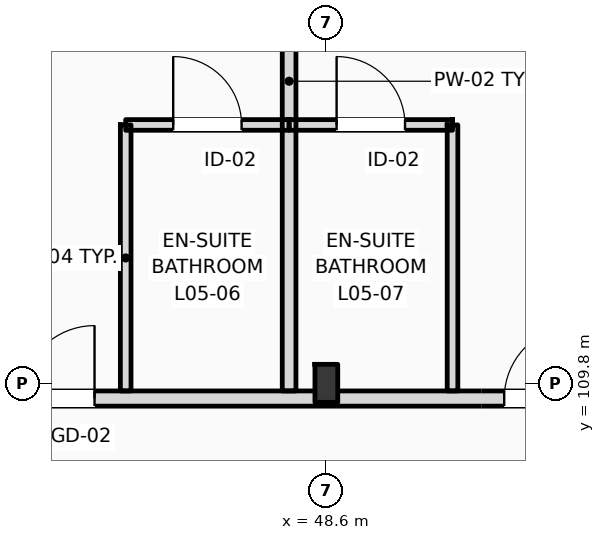
"""IFC4 building model, lengths in metres.
Left out: names, types, materials, properties, quantities, classifications, styles, units other than length and angle.
Written with IfcOpenShell. Run it as: python <this file> out.ifc"""

import sys

from ifc_helpers import new_model, si_unit, direction, frame, frame_2d, origin, origin_2d, place, context, subcontext, project, spatial, rectangle, i_section, extrude, element, fill, save


model = new_model("IFC4")
c1 = context("Model", 3, precision=1e-05, world=origin(), true_north=direction((0.0, 1.0)))
c2 = subcontext(c1, "Body", "Model", "MODEL_VIEW")
j1 = project(units=[si_unit("LENGTHUNIT", "METRE"), si_unit("PLANEANGLEUNIT", "RADIAN")], contexts=[c1])
p1 = place(None, origin())
s1 = spatial("IfcSite", under=j1, at=p1, CompositionType="ELEMENT")
p2 = place(p1, origin())
s2 = spatial("IfcBuilding", under=s1, at=p2, CompositionType="ELEMENT")
p3 = place(p2, frame((0.0, 0.0, 24.6)))
s3 = spatial("IfcBuildingStorey", under=s2, at=p3, CompositionType="ELEMENT", Elevation=24.6)
p4 = place(p3, frame((48.6, 109.8, 0.0), z_axis=(0.0, 0.0, 1.0), x_axis=(1.0, 0.0, 0.0)))
e1 = element("IfcColumn", 1, at=p4, inside=s3, PredefinedType="COLUMN", context=c2, shape_type="SweptSolid", body=[
    extrude(i_section(OverallWidth=0.3, OverallDepth=0.5, WebThickness=0.014, FlangeThickness=0.028, FilletRadius=0.027, at=origin_2d()), origin(), (0.0, 0.0, 1.0), 3.6),
])
p5 = place(p3, frame((10.65, 109.6, 0.0), z_axis=(0.0, 0.0, 1.0), x_axis=(1.0, 0.0, 0.0)))
e2 = element("IfcWall", 2, at=p5, inside=s3, PredefinedType="PARTITIONING", context=c2, shape_type="SweptSolid", body=[
    extrude(rectangle(XDim=109.21, YDim=0.2, at=frame_2d((54.605, 0.0))), origin(), (0.0, 0.0, 1.0), 2.78),
])
p6 = place(p5, frame((12.705, 0.0, 0.0)))
e3 = element("IfcOpeningElement", 3, at=p6, cuts=e2, PredefinedType="OPENING", context=c2, shape_type="SweptSolid", body=[
    extrude(rectangle(XDim=1.02, YDim=2.2, at=frame_2d((0.51, 1.1))), frame((0.0, 0.11, 0.0), z_axis=(0.0, -1.0, 0.0), x_axis=(1.0, 0.0, 0.0)), (0.0, 0.0, 1.0), 0.22),
])
p7 = place(p5, frame((19.26, 0.0, 0.0)))
e4 = element("IfcOpeningElement", 4, at=p7, cuts=e2, PredefinedType="OPENING", context=c2, shape_type="SweptSolid", body=[
    extrude(rectangle(XDim=1.02, YDim=2.2, at=frame_2d((0.51, 1.1))), frame((0.0, 0.11, 0.0), z_axis=(0.0, -1.0, 0.0), x_axis=(1.0, 0.0, 0.0)), (0.0, 0.0, 1.0), 0.22),
])
p8 = place(p5, frame((23.71, 0.0, 0.0)))
e5 = element("IfcOpeningElement", 5, at=p8, cuts=e2, PredefinedType="OPENING", context=c2, shape_type="SweptSolid", body=[
    extrude(rectangle(XDim=1.02, YDim=2.2, at=frame_2d((0.51, 1.1))), frame((0.0, 0.11, 0.0), z_axis=(0.0, -1.0, 0.0), x_axis=(1.0, 0.0, 0.0)), (0.0, 0.0, 1.0), 0.22),
])
p9 = place(p5, frame((27.66, 0.0, 0.0)))
e6 = element("IfcOpeningElement", 6, at=p9, cuts=e2, PredefinedType="OPENING", context=c2, shape_type="SweptSolid", body=[
    extrude(rectangle(XDim=1.02, YDim=2.2, at=frame_2d((0.51, 1.1))), frame((0.0, 0.11, 0.0), z_axis=(0.0, -1.0, 0.0), x_axis=(1.0, 0.0, 0.0)), (0.0, 0.0, 1.0), 0.22),
])
p10 = place(p5, frame((31.89, 0.0, 0.0)))
e7 = element("IfcOpeningElement", 7, at=p10, cuts=e2, PredefinedType="OPENING", context=c2, shape_type="SweptSolid", body=[
    extrude(rectangle(XDim=0.96, YDim=2.2, at=frame_2d((0.48, 1.1))), frame((0.0, 0.11, 0.0), z_axis=(0.0, -1.0, 0.0), x_axis=(1.0, 0.0, 0.0)), (0.0, 0.0, 1.0), 0.22),
])
p11 = place(p5, frame((33.94, 0.0, 0.0)))
e8 = element("IfcOpeningElement", 8, at=p11, cuts=e2, PredefinedType="OPENING", context=c2, shape_type="SweptSolid", body=[
    extrude(rectangle(XDim=0.96, YDim=2.2, at=frame_2d((0.48, 1.1))), frame((0.0, 0.11, 0.0), z_axis=(0.0, -1.0, 0.0), x_axis=(1.0, 0.0, 0.0)), (0.0, 0.0, 1.0), 0.22),
])
p12 = place(p5, frame((40.29, 0.0, 0.0)))
e9 = element("IfcOpeningElement", 9, at=p12, cuts=e2, PredefinedType="OPENING", context=c2, shape_type="SweptSolid", body=[
    extrude(rectangle(XDim=0.96, YDim=2.2, at=frame_2d((0.48, 1.1))), frame((0.0, 0.11, 0.0), z_axis=(0.0, -1.0, 0.0), x_axis=(1.0, 0.0, 0.0)), (0.0, 0.0, 1.0), 0.22),
])
p13 = place(p5, frame((42.34, 0.0, 0.0)))
e10 = element("IfcOpeningElement", 10, at=p13, cuts=e2, PredefinedType="OPENING", context=c2, shape_type="SweptSolid", body=[
    extrude(rectangle(XDim=0.96, YDim=2.2, at=frame_2d((0.48, 1.1))), frame((0.0, 0.11, 0.0), z_axis=(0.0, -1.0, 0.0), x_axis=(1.0, 0.0, 0.0)), (0.0, 0.0, 1.0), 0.22),
])
p14 = place(p5, frame((48.69, 0.0, 0.0)))
e11 = element("IfcOpeningElement", 11, at=p14, cuts=e2, PredefinedType="OPENING", context=c2, shape_type="SweptSolid", body=[
    extrude(rectangle(XDim=0.96, YDim=2.2, at=frame_2d((0.48, 1.1))), frame((0.0, 0.11, 0.0), z_axis=(0.0, -1.0, 0.0), x_axis=(1.0, 0.0, 0.0)), (0.0, 0.0, 1.0), 0.22),
])
p15 = place(p5, frame((50.74, 0.0, 0.0)))
e12 = element("IfcOpeningElement", 12, at=p15, cuts=e2, PredefinedType="OPENING", context=c2, shape_type="SweptSolid", body=[
    extrude(rectangle(XDim=0.96, YDim=2.2, at=frame_2d((0.48, 1.1))), frame((0.0, 0.11, 0.0), z_axis=(0.0, -1.0, 0.0), x_axis=(1.0, 0.0, 0.0)), (0.0, 0.0, 1.0), 0.22),
])
p16 = place(p5, frame((57.09, 0.0, 0.0)))
e13 = element("IfcOpeningElement", 13, at=p16, cuts=e2, PredefinedType="OPENING", context=c2, shape_type="SweptSolid", body=[
    extrude(rectangle(XDim=0.96, YDim=2.2, at=frame_2d((0.48, 1.1))), frame((0.0, 0.11, 0.0), z_axis=(0.0, -1.0, 0.0), x_axis=(1.0, 0.0, 0.0)), (0.0, 0.0, 1.0), 0.22),
])
p17 = place(p5, frame((59.14, 0.0, 0.0)))
e14 = element("IfcOpeningElement", 14, at=p17, cuts=e2, PredefinedType="OPENING", context=c2, shape_type="SweptSolid", body=[
    extrude(rectangle(XDim=0.96, YDim=2.2, at=frame_2d((0.48, 1.1))), frame((0.0, 0.11, 0.0), z_axis=(0.0, -1.0, 0.0), x_axis=(1.0, 0.0, 0.0)), (0.0, 0.0, 1.0), 0.22),
])
p18 = place(p5, frame((65.49, 0.0, 0.0)))
e15 = element("IfcOpeningElement", 15, at=p18, cuts=e2, PredefinedType="OPENING", context=c2, shape_type="SweptSolid", body=[
    extrude(rectangle(XDim=0.96, YDim=2.2, at=frame_2d((0.48, 1.1))), frame((0.0, 0.11, 0.0), z_axis=(0.0, -1.0, 0.0), x_axis=(1.0, 0.0, 0.0)), (0.0, 0.0, 1.0), 0.22),
])
p19 = place(p5, frame((67.54, 0.0, 0.0)))
e16 = element("IfcOpeningElement", 16, at=p19, cuts=e2, PredefinedType="OPENING", context=c2, shape_type="SweptSolid", body=[
    extrude(rectangle(XDim=0.96, YDim=2.2, at=frame_2d((0.48, 1.1))), frame((0.0, 0.11, 0.0), z_axis=(0.0, -1.0, 0.0), x_axis=(1.0, 0.0, 0.0)), (0.0, 0.0, 1.0), 0.22),
])
p20 = place(p5, frame((73.89, 0.0, 0.0)))
e17 = element("IfcOpeningElement", 17, at=p20, cuts=e2, PredefinedType="OPENING", context=c2, shape_type="SweptSolid", body=[
    extrude(rectangle(XDim=0.96, YDim=2.2, at=frame_2d((0.48, 1.1))), frame((0.0, 0.11, 0.0), z_axis=(0.0, -1.0, 0.0), x_axis=(1.0, 0.0, 0.0)), (0.0, 0.0, 1.0), 0.22),
])
p21 = place(p5, frame((78.09, 0.0, 0.0)))
e18 = element("IfcOpeningElement", 18, at=p21, cuts=e2, PredefinedType="OPENING", context=c2, shape_type="SweptSolid", body=[
    extrude(rectangle(XDim=0.96, YDim=2.2, at=frame_2d((0.48, 1.1))), frame((0.0, 0.11, 0.0), z_axis=(0.0, -1.0, 0.0), x_axis=(1.0, 0.0, 0.0)), (0.0, 0.0, 1.0), 0.22),
])
p22 = place(p5, frame((82.29, 0.0, 0.0)))
e19 = element("IfcOpeningElement", 19, at=p22, cuts=e2, PredefinedType="OPENING", context=c2, shape_type="SweptSolid", body=[
    extrude(rectangle(XDim=0.96, YDim=2.2, at=frame_2d((0.48, 1.1))), frame((0.0, 0.11, 0.0), z_axis=(0.0, -1.0, 0.0), x_axis=(1.0, 0.0, 0.0)), (0.0, 0.0, 1.0), 0.22),
])
p23 = place(p5, frame((86.49, 0.0, 0.0)))
e20 = element("IfcOpeningElement", 20, at=p23, cuts=e2, PredefinedType="OPENING", context=c2, shape_type="SweptSolid", body=[
    extrude(rectangle(XDim=0.96, YDim=2.2, at=frame_2d((0.48, 1.1))), frame((0.0, 0.11, 0.0), z_axis=(0.0, -1.0, 0.0), x_axis=(1.0, 0.0, 0.0)), (0.0, 0.0, 1.0), 0.22),
])
p24 = place(p5, frame((88.54, 0.0, 0.0)))
e21 = element("IfcOpeningElement", 21, at=p24, cuts=e2, PredefinedType="OPENING", context=c2, shape_type="SweptSolid", body=[
    extrude(rectangle(XDim=0.96, YDim=2.2, at=frame_2d((0.48, 1.1))), frame((0.0, 0.11, 0.0), z_axis=(0.0, -1.0, 0.0), x_axis=(1.0, 0.0, 0.0)), (0.0, 0.0, 1.0), 0.22),
])
p25 = place(p5, frame((94.89, 0.0, 0.0)))
e22 = element("IfcOpeningElement", 22, at=p25, cuts=e2, PredefinedType="OPENING", context=c2, shape_type="SweptSolid", body=[
    extrude(rectangle(XDim=0.96, YDim=2.2, at=frame_2d((0.48, 1.1))), frame((0.0, 0.11, 0.0), z_axis=(0.0, -1.0, 0.0), x_axis=(1.0, 0.0, 0.0)), (0.0, 0.0, 1.0), 0.22),
])
p26 = place(p5, frame((96.94, 0.0, 0.0)))
e23 = element("IfcOpeningElement", 23, at=p26, cuts=e2, PredefinedType="OPENING", context=c2, shape_type="SweptSolid", body=[
    extrude(rectangle(XDim=0.96, YDim=2.2, at=frame_2d((0.48, 1.1))), frame((0.0, 0.11, 0.0), z_axis=(0.0, -1.0, 0.0), x_axis=(1.0, 0.0, 0.0)), (0.0, 0.0, 1.0), 0.22),
])
p27 = place(p5, frame((103.29, 0.0, 0.0)))
e24 = element("IfcOpeningElement", 24, at=p27, cuts=e2, PredefinedType="OPENING", context=c2, shape_type="SweptSolid", body=[
    extrude(rectangle(XDim=0.96, YDim=2.2, at=frame_2d((0.48, 1.1))), frame((0.0, 0.11, 0.0), z_axis=(0.0, -1.0, 0.0), x_axis=(1.0, 0.0, 0.0)), (0.0, 0.0, 1.0), 0.22),
])
p28 = place(p5, frame((105.25, 0.0, 0.0)))
e25 = element("IfcOpeningElement", 25, at=p28, cuts=e2, PredefinedType="OPENING", context=c2, shape_type="SweptSolid", body=[
    extrude(rectangle(XDim=0.96, YDim=2.2, at=frame_2d((0.48, 1.1))), frame((0.0, 0.11, 0.0), z_axis=(0.0, -1.0, 0.0), x_axis=(1.0, 0.0, 0.0)), (0.0, 0.0, 1.0), 0.22),
])
p29 = place(p5, frame((2.716, 0.0, 0.0)))
e26 = element("IfcOpeningElement", 26, at=p29, cuts=e2, PredefinedType="OPENING", context=c2, shape_type="SweptSolid", body=[
    extrude(rectangle(XDim=1.35, YDim=2.25, at=frame_2d((0.675, 1.125))), frame((0.0, 0.11, 0.0), z_axis=(0.0, -1.0, 0.0), x_axis=(1.0, 0.0, 0.0)), (0.0, 0.0, 1.0), 0.22),
])
p30 = place(p5, frame((6.65, 0.0, 0.0)))
e27 = element("IfcOpeningElement", 27, at=p30, cuts=e2, PredefinedType="OPENING", context=c2, shape_type="SweptSolid", body=[
    extrude(rectangle(XDim=1.35, YDim=2.25, at=frame_2d((0.675, 1.125))), frame((0.0, 0.11, 0.0), z_axis=(0.0, -1.0, 0.0), x_axis=(1.0, 0.0, 0.0)), (0.0, 0.0, 1.0), 0.22),
])
p31 = place(p5, frame((10.583, 0.0, 0.0)))
e28 = element("IfcOpeningElement", 28, at=p31, cuts=e2, PredefinedType="OPENING", context=c2, shape_type="SweptSolid", body=[
    extrude(rectangle(XDim=1.35, YDim=2.25, at=frame_2d((0.675, 1.125))), frame((0.0, 0.11, 0.0), z_axis=(0.0, -1.0, 0.0), x_axis=(1.0, 0.0, 0.0)), (0.0, 0.0, 1.0), 0.22),
])
p32 = place(p3, frame((48.11, 109.7, 0.0), z_axis=(0.0, 0.0, 1.0), x_axis=(0.0, 1.0, 0.0)))
e29 = element("IfcWall", 29, at=p32, inside=s3, PredefinedType="PARTITIONING", context=c2, shape_type="SweptSolid", body=[
    extrude(rectangle(XDim=8.15, YDim=0.18, at=frame_2d((4.075, 0.0))), origin(), (0.0, 0.0, 1.0), 3.34),
])
p33 = place(p3, frame((45.96, 109.7, 0.0), z_axis=(0.0, 0.0, 1.0), x_axis=(0.0, 1.0, 0.0)))
e30 = element("IfcWall", 30, at=p33, inside=s3, PredefinedType="PARTITIONING", context=c2, shape_type="SweptSolid", body=[
    extrude(rectangle(XDim=3.5, YDim=0.14, at=frame_2d((1.75, 0.0))), origin(), (0.0, 0.0, 1.0), 3.03),
])
p34 = place(p3, frame((45.96, 113.2, 0.0), z_axis=(0.0, 0.0, 1.0), x_axis=(1.0, 0.0, 0.0)))
e31 = element("IfcWall", 31, at=p34, inside=s3, PredefinedType="PARTITIONING", context=c2, shape_type="SweptSolid", body=[
    extrude(rectangle(XDim=2.15, YDim=0.14, at=frame_2d((1.075, 0.0))), origin(), (0.0, 0.0, 1.0), 3.34),
])
p35 = place(p34, frame((0.625, 0.0, 0.0)))
e32 = element("IfcOpeningElement", 32, at=p35, cuts=e31, PredefinedType="OPENING", context=c2, shape_type="SweptSolid", body=[
    extrude(rectangle(XDim=0.9, YDim=2.1, at=frame_2d((0.45, 1.05))), frame((0.0, 0.08, 0.0), z_axis=(0.0, -1.0, 0.0), x_axis=(1.0, 0.0, 0.0)), (0.0, 0.0, 1.0), 0.16),
])
p36 = place(p3, frame((50.26, 109.7, 0.0), z_axis=(0.0, 0.0, 1.0), x_axis=(0.0, 1.0, 0.0)))
e33 = element("IfcWall", 33, at=p36, inside=s3, PredefinedType="PARTITIONING", context=c2, shape_type="SweptSolid", body=[
    extrude(rectangle(XDim=3.5, YDim=0.14, at=frame_2d((1.75, 0.0))), origin(), (0.0, 0.0, 1.0), 3.34),
])
p37 = place(p3, frame((48.11, 113.2, 0.0), z_axis=(0.0, 0.0, 1.0), x_axis=(1.0, 0.0, 0.0)))
e34 = element("IfcWall", 34, at=p37, inside=s3, PredefinedType="PARTITIONING", context=c2, shape_type="SweptSolid", body=[
    extrude(rectangle(XDim=2.15, YDim=0.14, at=frame_2d((1.075, 0.0))), origin(), (0.0, 0.0, 1.0), 3.34),
])
p38 = place(p37, frame((0.625, 0.0, 0.0)))
e35 = element("IfcOpeningElement", 35, at=p38, cuts=e34, PredefinedType="OPENING", context=c2, shape_type="SweptSolid", body=[
    extrude(rectangle(XDim=0.9, YDim=2.1, at=frame_2d((0.45, 1.05))), frame((0.0, 0.08, 0.0), z_axis=(0.0, -1.0, 0.0), x_axis=(1.0, 0.0, 0.0)), (0.0, 0.0, 1.0), 0.16),
])
p39 = place(p11, origin())
e36 = element("IfcDoor", 36, at=p39, inside=s3, OperationType="SINGLE_SWING_RIGHT", PredefinedType="DOOR", context=c2, shape_type="SweptSolid", body=[
    extrude(rectangle(XDim=0.96, YDim=2.2, at=frame_2d((0.48, 1.1))), frame((0.0, 0.025, 0.0), z_axis=(0.0, -1.0, 0.0), x_axis=(1.0, 0.0, 0.0)), (0.0, 0.0, 1.0), 0.05),
])
fill(e8, e36)
p40 = place(p35, origin())
e37 = element("IfcDoor", 37, at=p40, inside=s3, OperationType="SINGLE_SWING_LEFT", PredefinedType="DOOR", context=c2, shape_type="SweptSolid", body=[
    extrude(rectangle(XDim=0.9, YDim=2.1, at=frame_2d((0.45, 1.05))), frame((0.0, 0.025, 0.0), z_axis=(0.0, -1.0, 0.0), x_axis=(1.0, 0.0, 0.0)), (0.0, 0.0, 1.0), 0.05),
])
fill(e32, e37)
p41 = place(p12, origin())
e38 = element("IfcDoor", 38, at=p41, inside=s3, OperationType="SINGLE_SWING_RIGHT", PredefinedType="DOOR", context=c2, shape_type="SweptSolid", body=[
    extrude(rectangle(XDim=0.96, YDim=2.2, at=frame_2d((0.48, 1.1))), frame((0.0, 0.025, 0.0), z_axis=(0.0, -1.0, 0.0), x_axis=(1.0, 0.0, 0.0)), (0.0, 0.0, 1.0), 0.05),
])
fill(e9, e38)
p42 = place(p38, origin())
e39 = element("IfcDoor", 39, at=p42, inside=s3, OperationType="SINGLE_SWING_LEFT", PredefinedType="DOOR", context=c2, shape_type="SweptSolid", body=[
    extrude(rectangle(XDim=0.9, YDim=2.1, at=frame_2d((0.45, 1.05))), frame((0.0, 0.025, 0.0), z_axis=(0.0, -1.0, 0.0), x_axis=(1.0, 0.0, 0.0)), (0.0, 0.0, 1.0), 0.05),
])
fill(e35, e39)
save(model, sys.argv[1])
